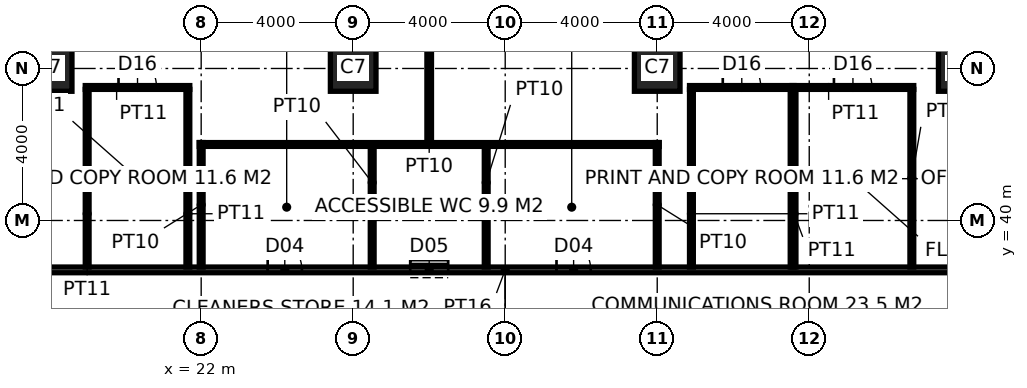
"""IFC4 building model, lengths in metres.
Left out: names, types, materials, properties, quantities, classifications, styles, units other than length and angle.
Written with IfcOpenShell. Run it as: python <this file> out.ifc"""

import sys

from ifc_helpers import new_model, si_unit, direction, frame, frame_2d, origin, origin_2d, place, context, subcontext, project, spatial, rectangle, hollow_rectangle, extrude, element, fill, save


model = new_model("IFC4")
c1 = context("Model", 3, precision=1e-05, world=origin(), true_north=direction((0.0, 1.0)))
c2 = subcontext(c1, "Body", "Model", "MODEL_VIEW")
j1 = project(units=[si_unit("LENGTHUNIT", "METRE"), si_unit("PLANEANGLEUNIT", "RADIAN")], contexts=[c1])
p1 = place(None, origin())
s1 = spatial("IfcSite", under=j1, at=p1, CompositionType="ELEMENT")
p2 = place(p1, origin())
s2 = spatial("IfcBuilding", under=s1, at=p2, CompositionType="ELEMENT")
p3 = place(p2, frame((0.0, 0.0, 63.0)))
s3 = spatial("IfcBuildingStorey", under=s2, at=p3, CompositionType="ELEMENT", Elevation=63.0)
for number, where, z_axis, x_axis in (
    (1, (18.0, 44.0, 0.0), (0.0, 0.0, 1.0), (1.0, 0.0, 0.0)),
    (2, (26.0, 44.0, 0.0), (0.0, 0.0, 1.0), (1.0, 0.0, 0.0)),
    (3, (34.0, 44.0, 0.0), (0.0, 0.0, 1.0), (1.0, 0.0, 0.0)),
    (4, (42.0, 44.0, 0.0), (0.0, 0.0, 1.0), (1.0, 0.0, 0.0)),
):
    element("IfcColumn", number, at=place(p3, frame(where, z_axis=z_axis, x_axis=x_axis)), inside=s3, PredefinedType="COLUMN", context=c2, shape_type="SweptSolid", body=[
        extrude(hollow_rectangle(XDim=1.2, YDim=1.2, WallThickness=0.1, at=origin_2d()), origin(), (0.0, 0.0, 1.0), 4.0),
    ])
p4 = place(p3, frame((15.775, 38.7, 0.0), z_axis=(0.0, 0.0, 1.0), x_axis=(1.0, 0.0, 0.0)))
e5 = element("IfcWall", 5, at=p4, inside=s3, PredefinedType="PARTITIONING", context=c2, shape_type="SweptSolid", body=[
    extrude(rectangle(XDim=28.45, YDim=0.15, at=frame_2d((14.225, 0.0))), origin(), (0.0, 0.0, 1.0), 3.85),
])
p5 = place(p4, frame((7.975, 0.0, 0.0)))
e6 = element("IfcOpeningElement", 6, at=p5, cuts=e5, PredefinedType="OPENING", context=c2, shape_type="SweptSolid", body=[
    extrude(rectangle(XDim=0.9, YDim=2.1, at=frame_2d((0.45, 1.05))), frame((0.0, 0.085, 0.0), z_axis=(0.0, -1.0, 0.0), x_axis=(1.0, 0.0, 0.0)), (0.0, 0.0, 1.0), 0.17),
])
p6 = place(p4, frame((11.725, 0.0, 0.0)))
e7 = element("IfcOpeningElement", 7, at=p6, cuts=e5, PredefinedType="OPENING", context=c2, shape_type="SweptSolid", body=[
    extrude(rectangle(XDim=1.0, YDim=2.1, at=frame_2d((0.5, 1.05))), frame((0.0, 0.085, 0.0), z_axis=(0.0, -1.0, 0.0), x_axis=(1.0, 0.0, 0.0)), (0.0, 0.0, 1.0), 0.17),
])
p7 = place(p4, frame((15.575, 0.0, 0.0)))
e8 = element("IfcOpeningElement", 8, at=p7, cuts=e5, PredefinedType="OPENING", context=c2, shape_type="SweptSolid", body=[
    extrude(rectangle(XDim=0.9, YDim=2.1, at=frame_2d((0.45, 1.05))), frame((0.0, 0.085, 0.0), z_axis=(0.0, -1.0, 0.0), x_axis=(1.0, 0.0, 0.0)), (0.0, 0.0, 1.0), 0.17),
])
for number, where, z_axis, x_axis in (
    (9, (22.0, 38.775, 0.0), (0.0, 0.0, 1.0), (0.0, 1.0, 0.0)),
    (10, (34.0, 38.775, 0.0), (0.0, 0.0, 1.0), (0.0, 1.0, 0.0)),
):
    element("IfcWall", number, at=place(p3, frame(where, z_axis=z_axis, x_axis=x_axis)), inside=s3, PredefinedType="PARTITIONING", context=c2, shape_type="SweptSolid", body=[
        extrude(rectangle(XDim=3.275, YDim=0.1, at=frame_2d((1.638, 0.0))), origin(), (0.0, 0.0, 1.0), 2.95),
    ])
p8 = place(p3, frame((21.95, 42.0, 0.0), z_axis=(0.0, 0.0, 1.0), x_axis=(1.0, 0.0, 0.0)))
e11 = element("IfcWall", 11, at=p8, inside=s3, PredefinedType="PARTITIONING", context=c2, shape_type="SweptSolid", body=[
    extrude(rectangle(XDim=12.1, YDim=0.1, at=frame_2d((6.05, 0.0))), origin(), (0.0, 0.0, 1.0), 3.85),
])
for number, where, z_axis, x_axis in (
    (12, (26.5, 38.775, 0.0), (0.0, 0.0, 1.0), (0.0, 1.0, 0.0)),
    (13, (29.5, 38.775, 0.0), (0.0, 0.0, 1.0), (0.0, 1.0, 0.0)),
):
    element("IfcWall", number, at=place(p3, frame(where, z_axis=z_axis, x_axis=x_axis)), inside=s3, PredefinedType="PARTITIONING", context=c2, shape_type="SweptSolid", body=[
        extrude(rectangle(XDim=3.175, YDim=0.1, at=frame_2d((1.587, 0.0))), origin(), (0.0, 0.0, 1.0), 3.85),
    ])
p9 = place(p3, frame((28.0, 42.05, 0.0), z_axis=(0.0, 0.0, 1.0), x_axis=(0.0, 1.0, 0.0)))
e14 = element("IfcWall", 14, at=p9, inside=s3, PredefinedType="PARTITIONING", context=c2, shape_type="SweptSolid", body=[
    extrude(rectangle(XDim=5.65, YDim=0.12, at=frame_2d((2.825, 0.0))), origin(), (0.0, 0.0, 1.0), 3.85),
])
p10 = place(p3, frame((18.95, 43.5, 0.0), z_axis=(0.0, 0.0, 1.0), x_axis=(1.0, 0.0, 0.0)))
e15 = element("IfcWall", 15, at=p10, inside=s3, PredefinedType="PARTITIONING", context=c2, shape_type="SweptSolid", body=[
    extrude(rectangle(XDim=2.75, YDim=0.1, at=frame_2d((1.375, 0.0))), origin(), (0.0, 0.0, 1.0), 3.85),
])
p11 = place(p10, frame((0.875, 0.0, 0.0)))
e16 = element("IfcOpeningElement", 16, at=p11, cuts=e15, PredefinedType="OPENING", context=c2, shape_type="SweptSolid", body=[
    extrude(rectangle(XDim=1.0, YDim=2.2, at=frame_2d((0.5, 1.1))), frame((0.0, 0.06, 0.0), z_axis=(0.0, -1.0, 0.0), x_axis=(1.0, 0.0, 0.0)), (0.0, 0.0, 1.0), 0.12),
])
p12 = place(p3, frame((34.85, 43.5, 0.0), z_axis=(0.0, 0.0, 1.0), x_axis=(1.0, 0.0, 0.0)))
e17 = element("IfcWall", 17, at=p12, inside=s3, PredefinedType="PARTITIONING", context=c2, shape_type="SweptSolid", body=[
    extrude(rectangle(XDim=2.75, YDim=0.1, at=frame_2d((1.375, 0.0))), origin(), (0.0, 0.0, 1.0), 3.85),
])
p13 = place(p12, frame((0.875, 0.0, 0.0)))
e18 = element("IfcOpeningElement", 18, at=p13, cuts=e17, PredefinedType="OPENING", context=c2, shape_type="SweptSolid", body=[
    extrude(rectangle(XDim=1.0, YDim=2.2, at=frame_2d((0.5, 1.1))), frame((0.0, 0.06, 0.0), z_axis=(0.0, -1.0, 0.0), x_axis=(1.0, 0.0, 0.0)), (0.0, 0.0, 1.0), 0.12),
])
p14 = place(p3, frame((37.55, 43.5, 0.0), z_axis=(0.0, 0.0, 1.0), x_axis=(1.0, 0.0, 0.0)))
e19 = element("IfcWall", 19, at=p14, inside=s3, PredefinedType="PARTITIONING", context=c2, shape_type="SweptSolid", body=[
    extrude(rectangle(XDim=3.2, YDim=0.1, at=frame_2d((1.6, 0.0))), origin(), (0.0, 0.0, 1.0), 3.85),
])
p15 = place(p14, frame((1.1, 0.0, 0.0)))
e20 = element("IfcOpeningElement", 20, at=p15, cuts=e19, PredefinedType="OPENING", context=c2, shape_type="SweptSolid", body=[
    extrude(rectangle(XDim=1.0, YDim=2.2, at=frame_2d((0.5, 1.1))), frame((0.0, 0.06, 0.0), z_axis=(0.0, -1.0, 0.0), x_axis=(1.0, 0.0, 0.0)), (0.0, 0.0, 1.0), 0.12),
])
for number, where, z_axis, x_axis in (
    (21, (19.0, 38.775, 0.0), (0.0, 0.0, 1.0), (0.0, 1.0, 0.0)),
    (22, (21.65, 38.775, 0.0), (0.0, 0.0, 1.0), (0.0, 1.0, 0.0)),
    (23, (34.9, 38.775, 0.0), (0.0, 0.0, 1.0), (0.0, 1.0, 0.0)),
    (24, (37.55, 38.775, 0.0), (0.0, 0.0, 1.0), (0.0, 1.0, 0.0)),
    (25, (37.6, 38.775, 0.0), (0.0, 0.0, 1.0), (0.0, 1.0, 0.0)),
    (26, (40.7, 38.775, 0.0), (0.0, 0.0, 1.0), (0.0, 1.0, 0.0)),
):
    element("IfcWall", number, at=place(p3, frame(where, z_axis=z_axis, x_axis=x_axis)), inside=s3, PredefinedType="PARTITIONING", context=c2, shape_type="SweptSolid", body=[
        extrude(rectangle(XDim=4.675, YDim=0.1, at=frame_2d((2.337, 0.0))), origin(), (0.0, 0.0, 1.0), 3.85),
    ])
p16 = place(p5, origin())
e27 = element("IfcDoor", 27, at=p16, inside=s3, OperationType="SINGLE_SWING_LEFT", PredefinedType="DOOR", context=c2, shape_type="SweptSolid", body=[
    extrude(rectangle(XDim=0.9, YDim=2.1, at=frame_2d((0.45, 1.05))), frame((0.0, 0.025, 0.0), z_axis=(0.0, -1.0, 0.0), x_axis=(1.0, 0.0, 0.0)), (0.0, 0.0, 1.0), 0.05),
])
fill(e6, e27)
p17 = place(p6, origin())
e28 = element("IfcDoor", 28, at=p17, inside=s3, OperationType="SLIDING_TO_LEFT", PredefinedType="DOOR", context=c2, shape_type="SweptSolid", body=[
    extrude(rectangle(XDim=1.0, YDim=2.1, at=frame_2d((0.5, 1.05))), frame((0.0, 0.025, 0.0), z_axis=(0.0, -1.0, 0.0), x_axis=(1.0, 0.0, 0.0)), (0.0, 0.0, 1.0), 0.05),
])
fill(e7, e28)
p18 = place(p7, origin())
e29 = element("IfcDoor", 29, at=p18, inside=s3, OperationType="SINGLE_SWING_LEFT", PredefinedType="DOOR", context=c2, shape_type="SweptSolid", body=[
    extrude(rectangle(XDim=0.9, YDim=2.1, at=frame_2d((0.45, 1.05))), frame((0.0, 0.025, 0.0), z_axis=(0.0, -1.0, 0.0), x_axis=(1.0, 0.0, 0.0)), (0.0, 0.0, 1.0), 0.05),
])
fill(e8, e29)
p19 = place(p11, origin())
e30 = element("IfcDoor", 30, at=p19, inside=s3, OperationType="SINGLE_SWING_LEFT", PredefinedType="DOOR", context=c2, shape_type="SweptSolid", body=[
    extrude(rectangle(XDim=1.0, YDim=2.2, at=frame_2d((0.5, 1.1))), frame((0.0, 0.025, 0.0), z_axis=(0.0, -1.0, 0.0), x_axis=(1.0, 0.0, 0.0)), (0.0, 0.0, 1.0), 0.05),
])
fill(e16, e30)
p20 = place(p13, origin())
e31 = element("IfcDoor", 31, at=p20, inside=s3, OperationType="SINGLE_SWING_LEFT", PredefinedType="DOOR", context=c2, shape_type="SweptSolid", body=[
    extrude(rectangle(XDim=1.0, YDim=2.2, at=frame_2d((0.5, 1.1))), frame((0.0, 0.025, 0.0), z_axis=(0.0, -1.0, 0.0), x_axis=(1.0, 0.0, 0.0)), (0.0, 0.0, 1.0), 0.05),
])
fill(e18, e31)
p21 = place(p15, origin())
e32 = element("IfcDoor", 32, at=p21, inside=s3, OperationType="SINGLE_SWING_LEFT", PredefinedType="DOOR", context=c2, shape_type="SweptSolid", body=[
    extrude(rectangle(XDim=1.0, YDim=2.2, at=frame_2d((0.5, 1.1))), frame((0.0, 0.025, 0.0), z_axis=(0.0, -1.0, 0.0), x_axis=(1.0, 0.0, 0.0)), (0.0, 0.0, 1.0), 0.05),
])
fill(e20, e32)
save(model, sys.argv[1])
